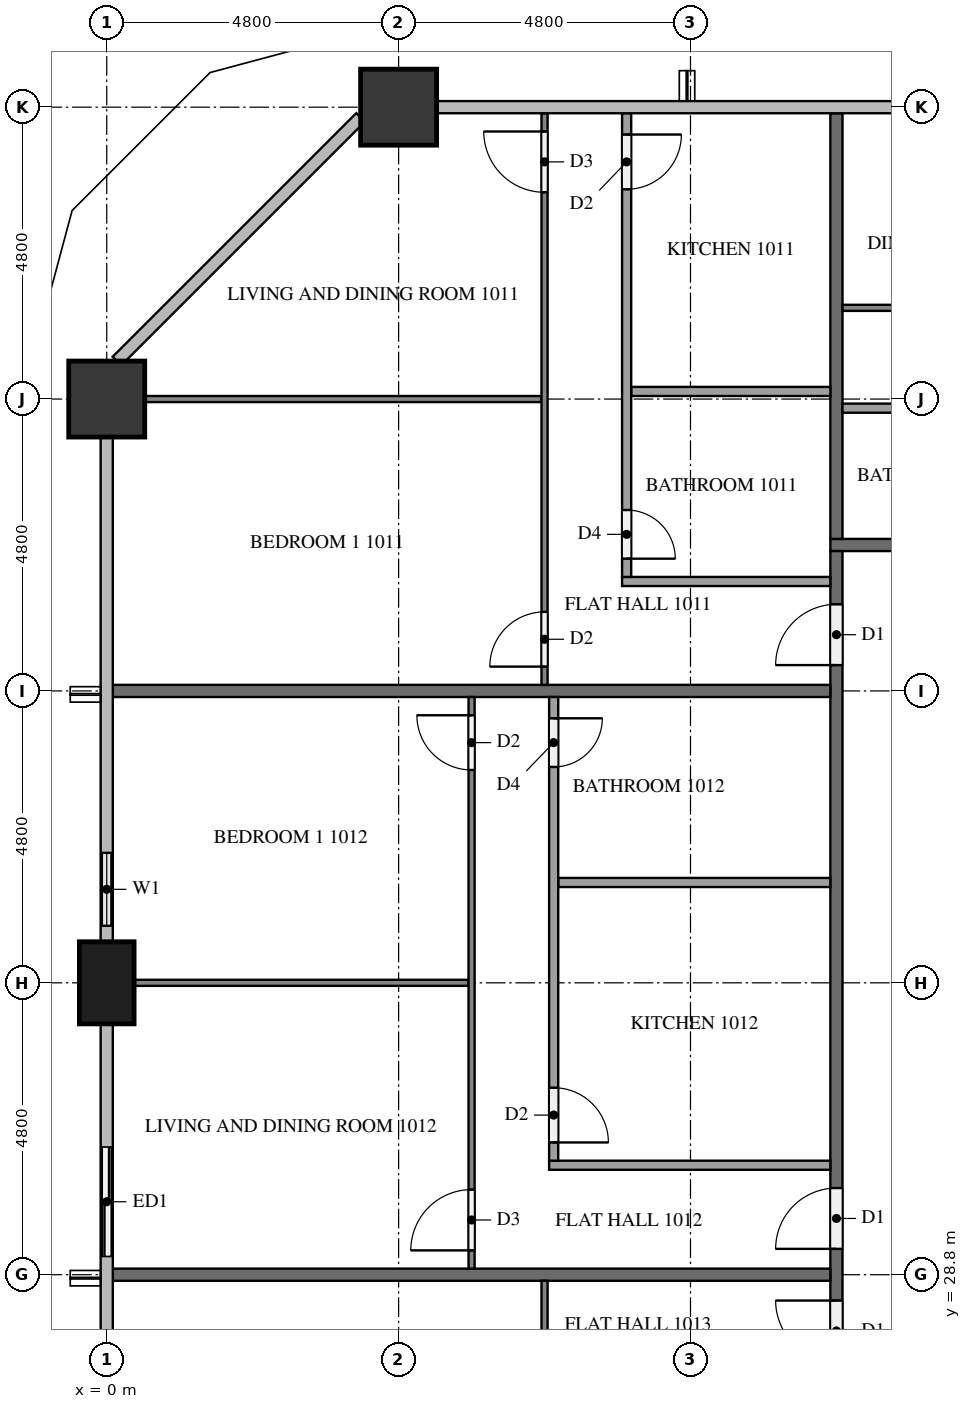
"""IFC4 building model, lengths in metres.
Left out: names, types, materials, properties, quantities, classifications, styles, units other than length and angle.
Written with IfcOpenShell. Run it as: python <this file> out.ifc"""

import sys

from ifc_helpers import new_model, si_unit, direction, frame, frame_2d, origin, origin_2d, place, context, subcontext, project, spatial, rectangle, extrude, element, fill, save


model = new_model("IFC4")
c1 = context("Model", 3, precision=1e-05, world=origin(), true_north=direction((0.0, 1.0)))
c2 = subcontext(c1, "Body", "Model", "MODEL_VIEW")
j1 = project(units=[si_unit("LENGTHUNIT", "METRE"), si_unit("PLANEANGLEUNIT", "RADIAN")], contexts=[c1])
p1 = place(None, origin())
s1 = spatial("IfcSite", under=j1, at=p1, CompositionType="ELEMENT")
p2 = place(p1, origin())
s2 = spatial("IfcBuilding", under=s1, at=p2, CompositionType="ELEMENT")
p3 = place(p2, frame((0.0, 0.0, 43.4)))
s3 = spatial("IfcBuildingStorey", under=s2, at=p3, CompositionType="ELEMENT", Elevation=43.4)
for number, where, z_axis, x_axis in (
    (1, (4.8, 48.0, 0.0), (0.0, 0.0, 1.0), (1.0, 0.0, 0.0)),
    (2, (0.0, 43.2, 0.0), (0.0, 0.0, 1.0), (1.0, 0.0, 0.0)),
):
    element("IfcColumn", number, at=place(p3, frame(where, z_axis=z_axis, x_axis=x_axis)), inside=s3, PredefinedType="COLUMN", context=c2, shape_type="SweptSolid", body=[
        extrude(rectangle(XDim=1.25, YDim=1.25, at=origin_2d()), origin(), (0.0, 0.0, 1.0), 3.2),
    ])
p4 = place(p3, frame((0.0, 33.6, 0.0), z_axis=(0.0, 0.0, 1.0), x_axis=(0.0, 1.0, 0.0)))
e3 = element("IfcColumn", 3, at=p4, inside=s3, PredefinedType="COLUMN", context=c2, shape_type="SweptSolid", body=[
    extrude(rectangle(XDim=1.35, YDim=0.9, at=origin_2d()), origin(), (0.0, 0.0, 1.0), 3.2),
])
p5 = place(p3, frame((0.0, 36.0, 0.0), z_axis=(0.0, 0.0, 1.0), x_axis=(0.0, -1.0, 0.0)))
e4 = element("IfcWall", 4, at=p5, inside=s3, PredefinedType="SOLIDWALL", context=c2, shape_type="SweptSolid", body=[
    extrude(rectangle(XDim=1.725, YDim=0.15, at=frame_2d((0.863, 0.0))), origin(), (0.0, 0.0, 1.0), 3.2),
])
p6 = place(p5, frame((0.262, 0.0, 0.9)))
e5 = element("IfcOpeningElement", 5, at=p6, cuts=e4, PredefinedType="OPENING", context=c2, shape_type="SweptSolid", body=[
    extrude(rectangle(XDim=1.2, YDim=1.4, at=frame_2d((0.6, 0.7))), frame((0.0, 0.085, 0.0), z_axis=(0.0, -1.0, 0.0), x_axis=(1.0, 0.0, 0.0)), (0.0, 0.0, 1.0), 0.17),
])
p7 = place(p3, frame((0.0, 31.2, 0.0), z_axis=(0.0, 0.0, 1.0), x_axis=(0.0, -1.0, 0.0)))
e6 = element("IfcWall", 6, at=p7, inside=s3, PredefinedType="SOLIDWALL", context=c2, shape_type="SweptSolid", body=[
    extrude(rectangle(XDim=2.4, YDim=0.15, at=frame_2d((1.2, 0.0))), origin(), (0.0, 0.0, 1.0), 3.2),
])
p8 = place(p7, frame((0.3, 0.0, 0.0)))
e7 = element("IfcOpeningElement", 7, at=p8, cuts=e6, PredefinedType="OPENING", context=c2, shape_type="SweptSolid", body=[
    extrude(rectangle(XDim=1.8, YDim=2.4, at=frame_2d((0.9, 1.2))), frame((0.0, 0.085, 0.0), z_axis=(0.0, -1.0, 0.0), x_axis=(1.0, 0.0, 0.0)), (0.0, 0.0, 1.0), 0.17),
])
p9 = place(p3, frame((11.9, 40.8, 0.0), z_axis=(0.0, 0.0, 1.0), x_axis=(1.0, 0.0, 0.0)))
e8 = element("IfcWall", 8, at=p9, inside=s3, PredefinedType="PARTITIONING", context=c2, shape_type="SweptSolid", body=[
    extrude(rectangle(XDim=38.6, YDim=0.2, at=frame_2d((19.3, 0.0))), origin(), (0.0, 0.0, 1.0), 3.2),
])
p10 = place(p9, frame((22.125, 0.0, 0.0)))
e9 = element("IfcOpeningElement", 9, at=p10, cuts=e8, PredefinedType="OPENING", context=c2, shape_type="SweptSolid", body=[
    extrude(rectangle(XDim=1.0, YDim=2.1, at=frame_2d((0.5, 1.05))), frame((0.0, 0.11, 0.0), z_axis=(0.0, -1.0, 0.0), x_axis=(1.0, 0.0, 0.0)), (0.0, 0.0, 1.0), 0.22),
])
p11 = place(p9, frame((10.125, 0.0, 0.0)))
e10 = element("IfcOpeningElement", 10, at=p11, cuts=e8, PredefinedType="OPENING", context=c2, shape_type="SweptSolid", body=[
    extrude(rectangle(XDim=1.0, YDim=2.1, at=frame_2d((0.5, 1.05))), frame((0.0, 0.11, 0.0), z_axis=(0.0, -1.0, 0.0), x_axis=(1.0, 0.0, 0.0)), (0.0, 0.0, 1.0), 0.22),
])
p12 = place(p9, frame((8.275, 0.0, 0.0)))
e11 = element("IfcOpeningElement", 11, at=p12, cuts=e8, PredefinedType="OPENING", context=c2, shape_type="SweptSolid", body=[
    extrude(rectangle(XDim=1.0, YDim=2.1, at=frame_2d((0.5, 1.05))), frame((0.0, 0.11, 0.0), z_axis=(0.0, -1.0, 0.0), x_axis=(1.0, 0.0, 0.0)), (0.0, 0.0, 1.0), 0.22),
])
p13 = place(p3, frame((12.0, 12.1, 0.0), z_axis=(0.0, 0.0, 1.0), x_axis=(0.0, 1.0, 0.0)))
e12 = element("IfcWall", 12, at=p13, inside=s3, PredefinedType="PARTITIONING", context=c2, shape_type="SweptSolid", body=[
    extrude(rectangle(XDim=28.6, YDim=0.2, at=frame_2d((14.3, 0.0))), origin(), (0.0, 0.0, 1.0), 3.2),
])
p14 = place(p13, frame((26.725, 0.0, 0.0)))
e13 = element("IfcOpeningElement", 13, at=p14, cuts=e12, PredefinedType="OPENING", context=c2, shape_type="SweptSolid", body=[
    extrude(rectangle(XDim=1.0, YDim=2.1, at=frame_2d((0.5, 1.05))), frame((0.0, 0.11, 0.0), z_axis=(0.0, -1.0, 0.0), x_axis=(1.0, 0.0, 0.0)), (0.0, 0.0, 1.0), 0.22),
])
p15 = place(p13, frame((17.125, 0.0, 0.0)))
e14 = element("IfcOpeningElement", 14, at=p15, cuts=e12, PredefinedType="OPENING", context=c2, shape_type="SweptSolid", body=[
    extrude(rectangle(XDim=1.0, YDim=2.1, at=frame_2d((0.5, 1.05))), frame((0.0, 0.11, 0.0), z_axis=(0.0, -1.0, 0.0), x_axis=(1.0, 0.0, 0.0)), (0.0, 0.0, 1.0), 0.22),
])
p16 = place(p13, frame((15.275, 0.0, 0.0)))
e15 = element("IfcOpeningElement", 15, at=p16, cuts=e12, PredefinedType="OPENING", context=c2, shape_type="SweptSolid", body=[
    extrude(rectangle(XDim=1.0, YDim=2.1, at=frame_2d((0.5, 1.05))), frame((0.0, 0.11, 0.0), z_axis=(0.0, -1.0, 0.0), x_axis=(1.0, 0.0, 0.0)), (0.0, 0.0, 1.0), 0.22),
])
p17 = place(p13, frame((5.675, 0.0, 0.0)))
e16 = element("IfcOpeningElement", 16, at=p17, cuts=e12, PredefinedType="OPENING", context=c2, shape_type="SweptSolid", body=[
    extrude(rectangle(XDim=1.0, YDim=2.1, at=frame_2d((0.5, 1.05))), frame((0.0, 0.11, 0.0), z_axis=(0.0, -1.0, 0.0), x_axis=(1.0, 0.0, 0.0)), (0.0, 0.0, 1.0), 0.22),
])
p18 = place(p3, frame((12.0, 47.9, 0.0), z_axis=(0.0, 0.0, 1.0), x_axis=(0.0, -1.0, 0.0)))
e17 = element("IfcWall", 17, at=p18, inside=s3, PredefinedType="PARTITIONING", context=c2, shape_type="SweptSolid", body=[
    extrude(rectangle(XDim=7.0, YDim=0.2, at=frame_2d((3.5, 0.0))), origin(), (0.0, 0.0, 1.0), 3.2),
])
for number, where, z_axis, x_axis in (
    (18, (0.1, 38.4, 0.0), (0.0, 0.0, 1.0), (1.0, 0.0, 0.0)),
    (19, (0.1, 28.8, 0.0), (0.0, 0.0, 1.0), (1.0, 0.0, 0.0)),
):
    element("IfcWall", number, at=place(p3, frame(where, z_axis=z_axis, x_axis=x_axis)), inside=s3, PredefinedType="PARTITIONING", context=c2, shape_type="SweptSolid", body=[
        extrude(rectangle(XDim=11.8, YDim=0.2, at=frame_2d((5.9, 0.0))), origin(), (0.0, 0.0, 1.0), 3.2),
    ])
p19 = place(p3, frame((12.1, 44.7, 0.0), z_axis=(0.0, 0.0, 1.0), x_axis=(1.0, 0.0, 0.0)))
e20 = element("IfcWall", 20, at=p19, inside=s3, PredefinedType="PARTITIONING", context=c2, shape_type="SweptSolid", body=[
    extrude(rectangle(XDim=9.4, YDim=0.1, at=frame_2d((4.7, 0.0))), origin(), (0.0, 0.0, 1.0), 3.2),
])
p20 = place(p19, frame((5.05, 0.0, 0.0)))
e21 = element("IfcOpeningElement", 21, at=p20, cuts=e20, PredefinedType="OPENING", context=c2, shape_type="SweptSolid", body=[
    extrude(rectangle(XDim=0.9, YDim=2.1, at=frame_2d((0.45, 1.05))), frame((0.0, 0.06, 0.0), z_axis=(0.0, -1.0, 0.0), x_axis=(1.0, 0.0, 0.0)), (0.0, 0.0, 1.0), 0.12),
])
p21 = place(p19, frame((3.35, 0.0, 0.0)))
e22 = element("IfcOpeningElement", 22, at=p21, cuts=e20, PredefinedType="OPENING", context=c2, shape_type="SweptSolid", body=[
    extrude(rectangle(XDim=1.0, YDim=2.1, at=frame_2d((0.5, 1.05))), frame((0.0, 0.06, 0.0), z_axis=(0.0, -1.0, 0.0), x_axis=(1.0, 0.0, 0.0)), (0.0, 0.0, 1.0), 0.12),
])
p22 = place(p3, frame((19.725, 43.05, 0.0), z_axis=(0.0, 0.0, 1.0), x_axis=(-1.0, 0.0, 0.0)))
e23 = element("IfcWall", 23, at=p22, inside=s3, PredefinedType="PARTITIONING", context=c2, shape_type="SweptSolid", body=[
    extrude(rectangle(XDim=7.625, YDim=0.15, at=frame_2d((3.812, 0.0))), origin(), (0.0, 0.0, 1.0), 3.2),
])
p23 = place(p22, frame((3.35, 0.0, 0.0)))
e24 = element("IfcOpeningElement", 24, at=p23, cuts=e23, PredefinedType="OPENING", context=c2, shape_type="SweptSolid", body=[
    extrude(rectangle(XDim=0.9, YDim=2.1, at=frame_2d((0.45, 1.05))), frame((0.0, 0.085, 0.0), z_axis=(0.0, -1.0, 0.0), x_axis=(1.0, 0.0, 0.0)), (0.0, 0.0, 1.0), 0.17),
])
p24 = place(p22, frame((4.9, 0.0, 0.0)))
e25 = element("IfcOpeningElement", 25, at=p24, cuts=e23, PredefinedType="OPENING", context=c2, shape_type="SweptSolid", body=[
    extrude(rectangle(XDim=0.8, YDim=2.1, at=frame_2d((0.4, 1.05))), frame((0.0, 0.085, 0.0), z_axis=(0.0, -1.0, 0.0), x_axis=(1.0, 0.0, 0.0)), (0.0, 0.0, 1.0), 0.17),
])
p25 = place(p3, frame((7.15, 43.2, 0.0), z_axis=(0.0, 0.0, 1.0), x_axis=(-1.0, 0.0, 0.0)))
e26 = element("IfcWall", 26, at=p25, inside=s3, PredefinedType="PARTITIONING", context=c2, shape_type="SweptSolid", body=[
    extrude(rectangle(XDim=6.525, YDim=0.1, at=frame_2d((3.262, 0.0))), origin(), (0.0, 0.0, 1.0), 3.2),
])
p26 = place(p3, frame((7.2, 38.5, 0.0), z_axis=(0.0, 0.0, 1.0), x_axis=(0.0, 1.0, 0.0)))
e27 = element("IfcWall", 27, at=p26, inside=s3, PredefinedType="PARTITIONING", context=c2, shape_type="SweptSolid", body=[
    extrude(rectangle(XDim=9.4, YDim=0.1, at=frame_2d((4.7, 0.0))), origin(), (0.0, 0.0, 1.0), 3.2),
])
p27 = place(p26, frame((0.3, 0.0, 0.0)))
e28 = element("IfcOpeningElement", 28, at=p27, cuts=e27, PredefinedType="OPENING", context=c2, shape_type="SweptSolid", body=[
    extrude(rectangle(XDim=0.9, YDim=2.1, at=frame_2d((0.45, 1.05))), frame((0.0, 0.06, 0.0), z_axis=(0.0, -1.0, 0.0), x_axis=(1.0, 0.0, 0.0)), (0.0, 0.0, 1.0), 0.12),
])
p28 = place(p26, frame((8.1, 0.0, 0.0)))
e29 = element("IfcOpeningElement", 29, at=p28, cuts=e27, PredefinedType="OPENING", context=c2, shape_type="SweptSolid", body=[
    extrude(rectangle(XDim=1.0, YDim=2.1, at=frame_2d((0.5, 1.05))), frame((0.0, 0.06, 0.0), z_axis=(0.0, -1.0, 0.0), x_axis=(1.0, 0.0, 0.0)), (0.0, 0.0, 1.0), 0.12),
])
p29 = place(p3, frame((11.9, 43.325, 0.0), z_axis=(0.0, 0.0, 1.0), x_axis=(-1.0, 0.0, 0.0)))
e30 = element("IfcWall", 30, at=p29, inside=s3, PredefinedType="PARTITIONING", context=c2, shape_type="SweptSolid", body=[
    extrude(rectangle(XDim=3.275, YDim=0.15, at=frame_2d((1.637, 0.0))), origin(), (0.0, 0.0, 1.0), 3.2),
])
p30 = place(p3, frame((11.9, 40.2, 0.0), z_axis=(0.0, 0.0, 1.0), x_axis=(-1.0, 0.0, 0.0)))
e31 = element("IfcWall", 31, at=p30, inside=s3, PredefinedType="PARTITIONING", context=c2, shape_type="SweptSolid", body=[
    extrude(rectangle(XDim=3.425, YDim=0.15, at=frame_2d((1.712, 0.0))), origin(), (0.0, 0.0, 1.0), 3.2),
])
p31 = place(p3, frame((8.55, 47.9, 0.0), z_axis=(0.0, 0.0, 1.0), x_axis=(0.0, -1.0, 0.0)))
e32 = element("IfcWall", 32, at=p31, inside=s3, PredefinedType="PARTITIONING", context=c2, shape_type="SweptSolid", body=[
    extrude(rectangle(XDim=7.625, YDim=0.15, at=frame_2d((3.812, 0.0))), origin(), (0.0, 0.0, 1.0), 3.2),
])
p32 = place(p31, frame((6.525, 0.0, 0.0)))
e33 = element("IfcOpeningElement", 33, at=p32, cuts=e32, PredefinedType="OPENING", context=c2, shape_type="SweptSolid", body=[
    extrude(rectangle(XDim=0.8, YDim=2.1, at=frame_2d((0.4, 1.05))), frame((0.0, 0.085, 0.0), z_axis=(0.0, -1.0, 0.0), x_axis=(1.0, 0.0, 0.0)), (0.0, 0.0, 1.0), 0.17),
])
p33 = place(p31, frame((0.35, 0.0, 0.0)))
e34 = element("IfcOpeningElement", 34, at=p33, cuts=e32, PredefinedType="OPENING", context=c2, shape_type="SweptSolid", body=[
    extrude(rectangle(XDim=0.9, YDim=2.1, at=frame_2d((0.45, 1.05))), frame((0.0, 0.085, 0.0), z_axis=(0.0, -1.0, 0.0), x_axis=(1.0, 0.0, 0.0)), (0.0, 0.0, 1.0), 0.17),
])
p34 = place(p3, frame((5.95, 33.6, 0.0), z_axis=(0.0, 0.0, 1.0), x_axis=(-1.0, 0.0, 0.0)))
e35 = element("IfcWall", 35, at=p34, inside=s3, PredefinedType="PARTITIONING", context=c2, shape_type="SweptSolid", body=[
    extrude(rectangle(XDim=5.5, YDim=0.1, at=frame_2d((2.75, 0.0))), origin(), (0.0, 0.0, 1.0), 3.2),
])
p35 = place(p3, frame((6.0, 28.9, 0.0), z_axis=(0.0, 0.0, 1.0), x_axis=(0.0, 1.0, 0.0)))
e36 = element("IfcWall", 36, at=p35, inside=s3, PredefinedType="PARTITIONING", context=c2, shape_type="SweptSolid", body=[
    extrude(rectangle(XDim=9.4, YDim=0.1, at=frame_2d((4.7, 0.0))), origin(), (0.0, 0.0, 1.0), 3.2),
])
p36 = place(p35, frame((0.3, 0.0, 0.0)))
e37 = element("IfcOpeningElement", 37, at=p36, cuts=e36, PredefinedType="OPENING", context=c2, shape_type="SweptSolid", body=[
    extrude(rectangle(XDim=1.0, YDim=2.1, at=frame_2d((0.5, 1.05))), frame((0.0, 0.06, 0.0), z_axis=(0.0, -1.0, 0.0), x_axis=(1.0, 0.0, 0.0)), (0.0, 0.0, 1.0), 0.12),
])
p37 = place(p35, frame((8.2, 0.0, 0.0)))
e38 = element("IfcOpeningElement", 38, at=p37, cuts=e36, PredefinedType="OPENING", context=c2, shape_type="SweptSolid", body=[
    extrude(rectangle(XDim=0.9, YDim=2.1, at=frame_2d((0.45, 1.05))), frame((0.0, 0.06, 0.0), z_axis=(0.0, -1.0, 0.0), x_axis=(1.0, 0.0, 0.0)), (0.0, 0.0, 1.0), 0.12),
])
p38 = place(p3, frame((11.9, 35.25, 0.0), z_axis=(0.0, 0.0, 1.0), x_axis=(-1.0, 0.0, 0.0)))
e39 = element("IfcWall", 39, at=p38, inside=s3, PredefinedType="PARTITIONING", context=c2, shape_type="SweptSolid", body=[
    extrude(rectangle(XDim=4.475, YDim=0.15, at=frame_2d((2.237, 0.0))), origin(), (0.0, 0.0, 1.0), 3.2),
])
p39 = place(p3, frame((11.9, 30.6, 0.0), z_axis=(0.0, 0.0, 1.0), x_axis=(-1.0, 0.0, 0.0)))
e40 = element("IfcWall", 40, at=p39, inside=s3, PredefinedType="PARTITIONING", context=c2, shape_type="SweptSolid", body=[
    extrude(rectangle(XDim=4.625, YDim=0.15, at=frame_2d((2.312, 0.0))), origin(), (0.0, 0.0, 1.0), 3.2),
])
p40 = place(p3, frame((7.35, 38.3, 0.0), z_axis=(0.0, 0.0, 1.0), x_axis=(0.0, -1.0, 0.0)))
e41 = element("IfcWall", 41, at=p40, inside=s3, PredefinedType="PARTITIONING", context=c2, shape_type="SweptSolid", body=[
    extrude(rectangle(XDim=7.625, YDim=0.15, at=frame_2d((3.812, 0.0))), origin(), (0.0, 0.0, 1.0), 3.2),
])
p41 = place(p40, frame((6.425, 0.0, 0.0)))
e42 = element("IfcOpeningElement", 42, at=p41, cuts=e41, PredefinedType="OPENING", context=c2, shape_type="SweptSolid", body=[
    extrude(rectangle(XDim=0.9, YDim=2.1, at=frame_2d((0.45, 1.05))), frame((0.0, 0.085, 0.0), z_axis=(0.0, -1.0, 0.0), x_axis=(1.0, 0.0, 0.0)), (0.0, 0.0, 1.0), 0.17),
])
p42 = place(p40, frame((0.35, 0.0, 0.0)))
e43 = element("IfcOpeningElement", 43, at=p42, cuts=e41, PredefinedType="OPENING", context=c2, shape_type="SweptSolid", body=[
    extrude(rectangle(XDim=0.8, YDim=2.1, at=frame_2d((0.4, 1.05))), frame((0.0, 0.085, 0.0), z_axis=(0.0, -1.0, 0.0), x_axis=(1.0, 0.0, 0.0)), (0.0, 0.0, 1.0), 0.17),
])
p43 = place(p3, frame((7.2, 19.3, 0.0), z_axis=(0.0, 0.0, 1.0), x_axis=(0.0, 1.0, 0.0)))
e44 = element("IfcWall", 44, at=p43, inside=s3, PredefinedType="PARTITIONING", context=c2, shape_type="SweptSolid", body=[
    extrude(rectangle(XDim=9.4, YDim=0.1, at=frame_2d((4.7, 0.0))), origin(), (0.0, 0.0, 1.0), 3.2),
])
p44 = place(p43, frame((5.05, 0.0, 0.0)))
e45 = element("IfcOpeningElement", 45, at=p44, cuts=e44, PredefinedType="OPENING", context=c2, shape_type="SweptSolid", body=[
    extrude(rectangle(XDim=1.0, YDim=2.1, at=frame_2d((0.5, 1.05))), frame((0.0, 0.06, 0.0), z_axis=(0.0, -1.0, 0.0), x_axis=(1.0, 0.0, 0.0)), (0.0, 0.0, 1.0), 0.12),
])
p45 = place(p43, frame((3.45, 0.0, 0.0)))
e46 = element("IfcOpeningElement", 46, at=p45, cuts=e44, PredefinedType="OPENING", context=c2, shape_type="SweptSolid", body=[
    extrude(rectangle(XDim=0.9, YDim=2.1, at=frame_2d((0.45, 1.05))), frame((0.0, 0.06, 0.0), z_axis=(0.0, -1.0, 0.0), x_axis=(1.0, 0.0, 0.0)), (0.0, 0.0, 1.0), 0.12),
])
p46 = place(p6, origin())
e47 = element("IfcWindow", 47, at=p46, inside=s3, PartitioningType="SINGLE_PANEL", PredefinedType="WINDOW", context=c2, shape_type="SweptSolid", body=[
    extrude(rectangle(XDim=1.2, YDim=1.4, at=frame_2d((0.6, 0.7))), frame((0.0, 0.03, 0.0), z_axis=(0.0, -1.0, 0.0), x_axis=(1.0, 0.0, 0.0)), (0.0, 0.0, 1.0), 0.06),
])
fill(e5, e47)
p47 = place(p8, origin())
e48 = element("IfcDoor", 48, at=p47, inside=s3, OperationType="SLIDING_TO_RIGHT", PredefinedType="DOOR", context=c2, shape_type="SweptSolid", body=[
    extrude(rectangle(XDim=1.8, YDim=2.4, at=frame_2d((0.9, 1.2))), frame((0.0, 0.025, 0.0), z_axis=(0.0, -1.0, 0.0), x_axis=(1.0, 0.0, 0.0)), (0.0, 0.0, 1.0), 0.05),
])
fill(e7, e48)
p48 = place(p14, origin())
e49 = element("IfcDoor", 49, at=p48, inside=s3, OperationType="SINGLE_SWING_LEFT", PredefinedType="DOOR", context=c2, shape_type="SweptSolid", body=[
    extrude(rectangle(XDim=1.0, YDim=2.1, at=frame_2d((0.5, 1.05))), frame((0.0, 0.025, 0.0), z_axis=(0.0, -1.0, 0.0), x_axis=(1.0, 0.0, 0.0)), (0.0, 0.0, 1.0), 0.05),
])
fill(e13, e49)
p49 = place(p15, origin())
e50 = element("IfcDoor", 50, at=p49, inside=s3, OperationType="SINGLE_SWING_LEFT", PredefinedType="DOOR", context=c2, shape_type="SweptSolid", body=[
    extrude(rectangle(XDim=1.0, YDim=2.1, at=frame_2d((0.5, 1.05))), frame((0.0, 0.025, 0.0), z_axis=(0.0, -1.0, 0.0), x_axis=(1.0, 0.0, 0.0)), (0.0, 0.0, 1.0), 0.05),
])
fill(e14, e50)
p50 = place(p16, origin())
e51 = element("IfcDoor", 51, at=p50, inside=s3, OperationType="SINGLE_SWING_RIGHT", PredefinedType="DOOR", context=c2, shape_type="SweptSolid", body=[
    extrude(rectangle(XDim=1.0, YDim=2.1, at=frame_2d((0.5, 1.05))), frame((0.0, 0.025, 0.0), z_axis=(0.0, -1.0, 0.0), x_axis=(1.0, 0.0, 0.0)), (0.0, 0.0, 1.0), 0.05),
])
fill(e15, e51)
p51 = place(p27, origin())
e52 = element("IfcDoor", 52, at=p51, inside=s3, OperationType="SINGLE_SWING_LEFT", PredefinedType="DOOR", context=c2, shape_type="SweptSolid", body=[
    extrude(rectangle(XDim=0.9, YDim=2.1, at=frame_2d((0.45, 1.05))), frame((0.0, 0.025, 0.0), z_axis=(0.0, -1.0, 0.0), x_axis=(1.0, 0.0, 0.0)), (0.0, 0.0, 1.0), 0.05),
])
fill(e28, e52)
p52 = place(p28, origin())
e53 = element("IfcDoor", 53, at=p52, inside=s3, OperationType="SINGLE_SWING_RIGHT", PredefinedType="DOOR", context=c2, shape_type="SweptSolid", body=[
    extrude(rectangle(XDim=1.0, YDim=2.1, at=frame_2d((0.5, 1.05))), frame((0.0, 0.025, 0.0), z_axis=(0.0, -1.0, 0.0), x_axis=(1.0, 0.0, 0.0)), (0.0, 0.0, 1.0), 0.05),
])
fill(e29, e53)
p53 = place(p32, origin())
e54 = element("IfcDoor", 54, at=p53, inside=s3, OperationType="SINGLE_SWING_RIGHT", PredefinedType="DOOR", context=c2, shape_type="SweptSolid", body=[
    extrude(rectangle(XDim=0.8, YDim=2.1, at=frame_2d((0.4, 1.05))), frame((0.0, 0.025, 0.0), z_axis=(0.0, -1.0, 0.0), x_axis=(1.0, 0.0, 0.0)), (0.0, 0.0, 1.0), 0.05),
])
fill(e33, e54)
p54 = place(p33, origin())
e55 = element("IfcDoor", 55, at=p54, inside=s3, OperationType="SINGLE_SWING_LEFT", PredefinedType="DOOR", context=c2, shape_type="SweptSolid", body=[
    extrude(rectangle(XDim=0.9, YDim=2.1, at=frame_2d((0.45, 1.05))), frame((0.0, 0.025, 0.0), z_axis=(0.0, -1.0, 0.0), x_axis=(1.0, 0.0, 0.0)), (0.0, 0.0, 1.0), 0.05),
])
fill(e34, e55)
p55 = place(p36, origin())
e56 = element("IfcDoor", 56, at=p55, inside=s3, OperationType="SINGLE_SWING_LEFT", PredefinedType="DOOR", context=c2, shape_type="SweptSolid", body=[
    extrude(rectangle(XDim=1.0, YDim=2.1, at=frame_2d((0.5, 1.05))), frame((0.0, 0.025, 0.0), z_axis=(0.0, -1.0, 0.0), x_axis=(1.0, 0.0, 0.0)), (0.0, 0.0, 1.0), 0.05),
])
fill(e37, e56)
p56 = place(p37, origin())
e57 = element("IfcDoor", 57, at=p56, inside=s3, OperationType="SINGLE_SWING_RIGHT", PredefinedType="DOOR", context=c2, shape_type="SweptSolid", body=[
    extrude(rectangle(XDim=0.9, YDim=2.1, at=frame_2d((0.45, 1.05))), frame((0.0, 0.025, 0.0), z_axis=(0.0, -1.0, 0.0), x_axis=(1.0, 0.0, 0.0)), (0.0, 0.0, 1.0), 0.05),
])
fill(e38, e57)
p57 = place(p41, origin())
e58 = element("IfcDoor", 58, at=p57, inside=s3, OperationType="SINGLE_SWING_RIGHT", PredefinedType="DOOR", context=c2, shape_type="SweptSolid", body=[
    extrude(rectangle(XDim=0.9, YDim=2.1, at=frame_2d((0.45, 1.05))), frame((0.0, 0.025, 0.0), z_axis=(0.0, -1.0, 0.0), x_axis=(1.0, 0.0, 0.0)), (0.0, 0.0, 1.0), 0.05),
])
fill(e42, e58)
p58 = place(p42, origin())
e59 = element("IfcDoor", 59, at=p58, inside=s3, OperationType="SINGLE_SWING_LEFT", PredefinedType="DOOR", context=c2, shape_type="SweptSolid", body=[
    extrude(rectangle(XDim=0.8, YDim=2.1, at=frame_2d((0.4, 1.05))), frame((0.0, 0.025, 0.0), z_axis=(0.0, -1.0, 0.0), x_axis=(1.0, 0.0, 0.0)), (0.0, 0.0, 1.0), 0.05),
])
fill(e43, e59)
save(model, sys.argv[1])
